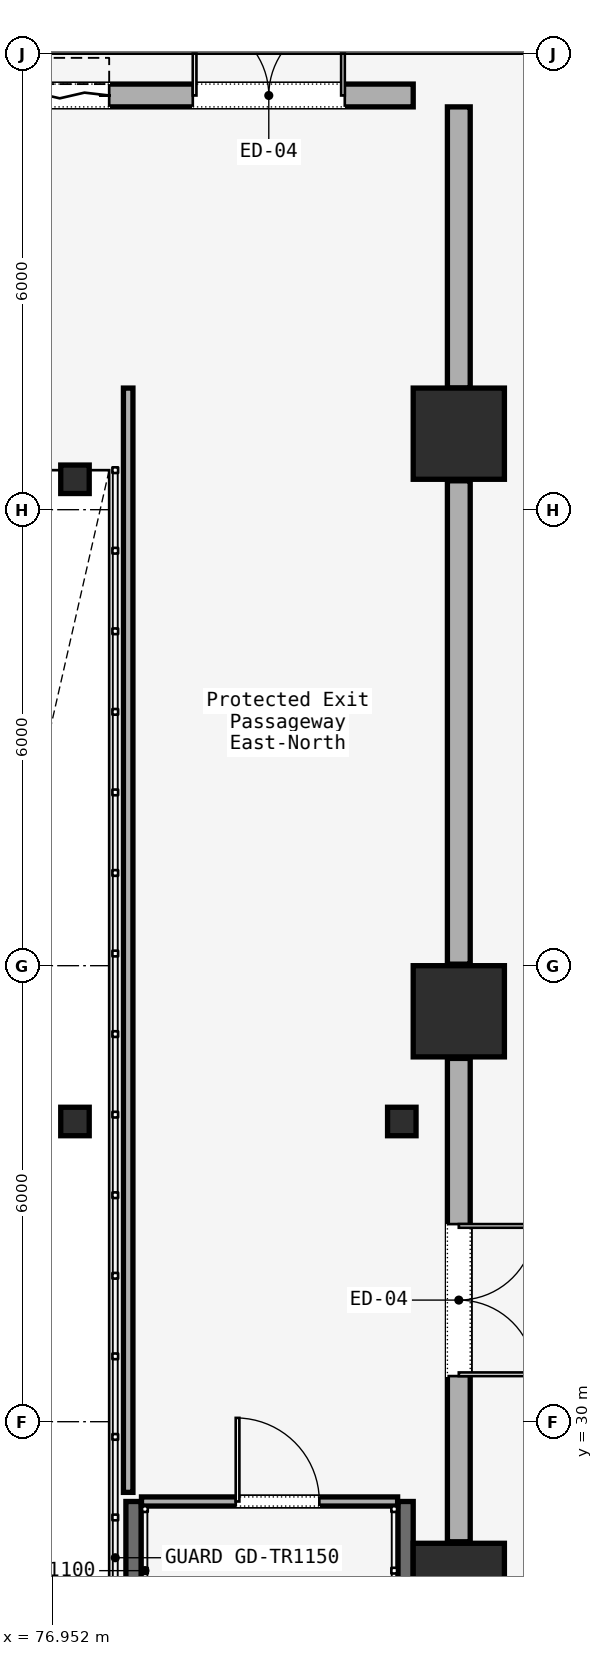
"""IFC4 building model, lengths in metres.
Left out: names, types, materials, properties, quantities, classifications, styles, units other than length and angle.
Written with IfcOpenShell. Run it as: python <this file> out.ifc"""

import sys

from ifc_helpers import new_model, si_unit, direction, frame, frame_2d, origin, origin_2d, place, context, subcontext, project, spatial, rectangle, i_section, extrude, element, fill, save


model = new_model("IFC4")
c1 = context("Model", 3, precision=1e-05, world=origin(), true_north=direction((0.0, 1.0)))
c2 = subcontext(c1, "Body", "Model", "MODEL_VIEW")
j1 = project(units=[si_unit("LENGTHUNIT", "METRE"), si_unit("PLANEANGLEUNIT", "RADIAN")], contexts=[c1])
p1 = place(None, origin())
s1 = spatial("IfcSite", under=j1, at=p1, CompositionType="ELEMENT")
p2 = place(p1, origin())
s2 = spatial("IfcBuilding", under=s1, at=p2, CompositionType="ELEMENT")
p3 = place(p2, origin())
s3 = spatial("IfcBuildingStorey", under=s2, at=p3, CompositionType="ELEMENT", Elevation=0.0)
for number, where, z_axis, x_axis in (
    (1, (82.3, 27.8, 0.0), (0.0, 0.0, 1.0), (1.0, 0.0, 0.0)),
    (2, (82.3, 35.4, 0.0), (0.0, 0.0, 1.0), (1.0, 0.0, 0.0)),
    (3, (82.3, 43.0, 0.0), (0.0, 0.0, 1.0), (1.0, 0.0, 0.0)),
):
    element("IfcColumn", number, at=place(p3, frame(where, z_axis=z_axis, x_axis=x_axis)), inside=s3, PredefinedType="COLUMN", context=c2, shape_type="SweptSolid", body=[
        extrude(rectangle(XDim=1.2, YDim=1.2, at=origin_2d()), origin(), (0.0, 0.0, 1.0), 5.7),
    ])
for number, where, z_axis, x_axis in (
    (4, (77.25, 33.95, 0.0), (0.0, 0.0, 1.0), (1.0, 0.0, 0.0)),
    (5, (77.25, 42.4, 0.0), (0.0, 0.0, 1.0), (1.0, 0.0, 0.0)),
    (6, (81.55, 33.95, 0.0), (0.0, 0.0, 1.0), (1.0, 0.0, 0.0)),
):
    element("IfcColumn", number, at=place(p3, frame(where, z_axis=z_axis, x_axis=x_axis)), inside=s3, PredefinedType="COLUMN", context=c2, shape_type="SweptSolid", body=[
        extrude(i_section(OverallWidth=0.375, OverallDepth=0.375, WebThickness=0.017, FlangeThickness=0.027, FilletRadius=0.015, at=origin_2d()), origin(), (0.0, 0.0, 1.0), 6.0),
    ])
p4 = place(p3, frame((52.95, 47.45, 0.0), z_axis=(0.0, 0.0, 1.0), x_axis=(1.0, 0.0, 0.0)))
e7 = element("IfcWall", 7, at=p4, inside=s3, PredefinedType="SOLIDWALL", context=c2, shape_type="SweptSolid", body=[
    extrude(rectangle(XDim=28.75, YDim=0.3, at=frame_2d((14.375, 0.0))), origin(), (0.0, 0.0, 1.0), 5.7),
])
p5 = place(p4, frame((25.85, 0.0, 0.0)))
e8 = element("IfcOpeningElement", 8, at=p5, cuts=e7, PredefinedType="OPENING", context=c2, shape_type="SweptSolid", body=[
    extrude(rectangle(XDim=2.0, YDim=2.3, at=frame_2d((1.0, 1.15))), frame((0.0, 0.15, 0.0), z_axis=(0.0, -1.0, 0.0), x_axis=(1.0, 0.0, 0.0)), (0.0, 0.0, 1.0), 0.3),
])
p6 = place(p4, frame((18.25, 0.0, 0.0)))
e9 = element("IfcOpeningElement", 9, at=p6, cuts=e7, PredefinedType="OPENING", context=c2, shape_type="SweptSolid", body=[
    extrude(rectangle(XDim=6.5, YDim=4.2, at=frame_2d((3.25, 2.1))), frame((0.0, 0.15, 0.0), z_axis=(0.0, -1.0, 0.0), x_axis=(1.0, 0.0, 0.0)), (0.0, 0.0, 1.0), 0.3),
])
p7 = place(p3, frame((82.3, 34.78, 0.0), z_axis=(0.0, 0.0, 1.0), x_axis=(0.0, -1.0, 0.0)))
e10 = element("IfcWall", 10, at=p7, inside=s3, PredefinedType="SOLIDWALL", context=c2, shape_type="SweptSolid", body=[
    extrude(rectangle(XDim=6.36, YDim=0.3, at=frame_2d((3.18, 0.0))), origin(), (0.0, 0.0, 1.0), 5.7),
])
p8 = place(p7, frame((2.18, 0.0, 0.0)))
e11 = element("IfcOpeningElement", 11, at=p8, cuts=e10, PredefinedType="OPENING", context=c2, shape_type="SweptSolid", body=[
    extrude(rectangle(XDim=2.0, YDim=2.3, at=frame_2d((1.0, 1.15))), frame((0.0, 0.15, 0.0), z_axis=(0.0, -1.0, 0.0), x_axis=(1.0, 0.0, 0.0)), (0.0, 0.0, 1.0), 0.3),
])
p9 = place(p3, frame((82.3, 42.38, 0.0), z_axis=(0.0, 0.0, 1.0), x_axis=(0.0, -1.0, 0.0)))
e12 = element("IfcWall", 12, at=p9, inside=s3, PredefinedType="SOLIDWALL", context=c2, shape_type="SweptSolid", body=[
    extrude(rectangle(XDim=6.36, YDim=0.3, at=frame_2d((3.18, 0.0))), origin(), (0.0, 0.0, 1.0), 5.7),
])
p10 = place(p3, frame((82.3, 47.3, 0.0), z_axis=(0.0, 0.0, 1.0), x_axis=(0.0, -1.0, 0.0)))
e13 = element("IfcWall", 13, at=p10, inside=s3, PredefinedType="SOLIDWALL", context=c2, shape_type="SweptSolid", body=[
    extrude(rectangle(XDim=3.7, YDim=0.3, at=frame_2d((1.85, 0.0))), origin(), (0.0, 0.0, 1.0), 5.7),
])
for number, where, z_axis, x_axis in (
    (14, (78.02, 28.95, -0.4), (0.0, 0.0, 1.0), (0.0, -1.0, 0.0)),
    (15, (81.6, 28.95, -0.4), (0.0, 0.0, 1.0), (0.0, -1.0, 0.0)),
):
    element("IfcWall", number, at=place(p3, frame(where, z_axis=z_axis, x_axis=x_axis)), inside=s3, PredefinedType="SOLIDWALL", context=c2, shape_type="SweptSolid", body=[
        extrude(rectangle(XDim=7.95, YDim=0.2, at=frame_2d((3.975, 0.0))), origin(), (0.0, 0.0, 1.0), 6.4),
    ])
p11 = place(p3, frame((78.125, 28.95, 0.0), z_axis=(0.0, 0.0, 1.0), x_axis=(1.0, 0.0, 0.0)))
e16 = element("IfcWall", 16, at=p11, inside=s3, PredefinedType="SOLIDWALL", context=c2, shape_type="SweptSolid", body=[
    extrude(rectangle(XDim=3.37, YDim=0.12, at=frame_2d((1.685, 0.0))), origin(), (0.0, 0.0, 1.0), 3.6),
])
p12 = place(p11, frame((1.24, 0.0, 0.0)))
e17 = element("IfcOpeningElement", 17, at=p12, cuts=e16, PredefinedType="OPENING", context=c2, shape_type="SweptSolid", body=[
    extrude(rectangle(XDim=1.1, YDim=2.2, at=frame_2d((0.55, 1.1))), frame((0.0, 0.06, 0.0), z_axis=(0.0, -1.0, 0.0), x_axis=(1.0, 0.0, 0.0)), (0.0, 0.0, 1.0), 0.12),
])
p13 = place(p3, frame((77.95, 29.07, 0.0), z_axis=(0.0, 0.0, 1.0), x_axis=(0.0, 1.0, 0.0)))
e18 = element("IfcWall", 18, at=p13, inside=s3, PredefinedType="PARTITIONING", context=c2, shape_type="SweptSolid", body=[
    extrude(rectangle(XDim=14.53, YDim=0.125, at=frame_2d((7.265, 0.0))), origin(), (0.0, 0.0, 1.0), 3.6),
])
p14 = place(p5, origin())
e19 = element("IfcDoor", 19, at=p14, inside=s3, OperationType="DOUBLE_DOOR_SINGLE_SWING", PredefinedType="DOOR", context=c2, shape_type="SweptSolid", body=[
    extrude(rectangle(XDim=2.0, YDim=2.3, at=frame_2d((1.0, 1.15))), frame((0.0, 0.025, 0.0), z_axis=(0.0, -1.0, 0.0), x_axis=(1.0, 0.0, 0.0)), (0.0, 0.0, 1.0), 0.05),
])
fill(e8, e19)
p15 = place(p6, origin())
e20 = element("IfcDoor", 20, at=p15, inside=s3, OperationType="ROLLINGUP", PredefinedType="GATE", context=c2, shape_type="SweptSolid", body=[
    extrude(rectangle(XDim=6.5, YDim=4.2, at=frame_2d((3.25, 2.1))), frame((0.0, 0.025, 0.0), z_axis=(0.0, -1.0, 0.0), x_axis=(1.0, 0.0, 0.0)), (0.0, 0.0, 1.0), 0.05),
])
fill(e9, e20)
p16 = place(p8, origin())
e21 = element("IfcDoor", 21, at=p16, inside=s3, OperationType="DOUBLE_DOOR_SINGLE_SWING", PredefinedType="DOOR", context=c2, shape_type="SweptSolid", body=[
    extrude(rectangle(XDim=2.0, YDim=2.3, at=frame_2d((1.0, 1.15))), frame((0.0, 0.025, 0.0), z_axis=(0.0, -1.0, 0.0), x_axis=(1.0, 0.0, 0.0)), (0.0, 0.0, 1.0), 0.05),
])
fill(e11, e21)
p17 = place(p12, origin())
e22 = element("IfcDoor", 22, at=p17, inside=s3, OperationType="SINGLE_SWING_LEFT", PredefinedType="DOOR", context=c2, shape_type="SweptSolid", body=[
    extrude(rectangle(XDim=1.1, YDim=2.2, at=frame_2d((0.55, 1.1))), frame((0.0, 0.025, 0.0), z_axis=(0.0, -1.0, 0.0), x_axis=(1.0, 0.0, 0.0)), (0.0, 0.0, 1.0), 0.05),
])
fill(e17, e22)
save(model, sys.argv[1])
